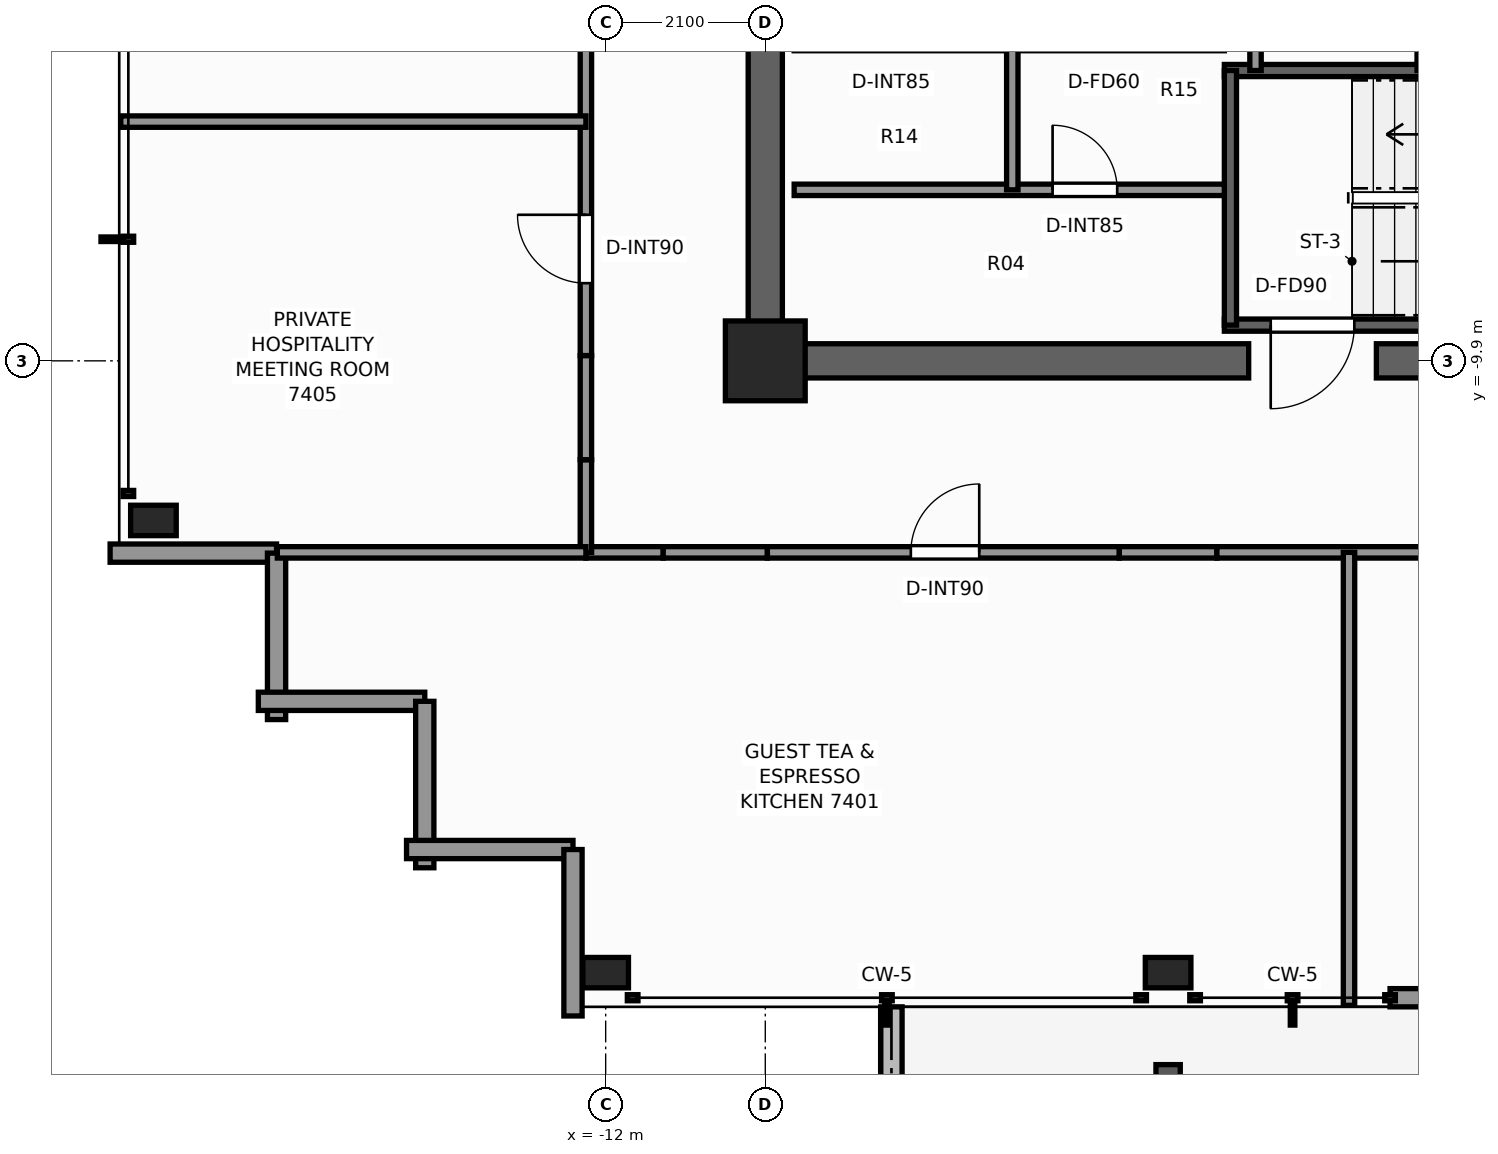
"""IFC4 building model, lengths in metres.
Left out: names, types, materials, properties, quantities, classifications, styles, units other than length and angle.
Written with IfcOpenShell. Run it as: python <this file> out.ifc"""

import sys

from ifc_helpers import new_model, si_unit, direction, frame, frame_2d, origin, origin_2d, place, context, subcontext, project, spatial, rectangle, extrude, element, fill, save


model = new_model("IFC4")
c1 = context("Model", 3, precision=1e-05, world=origin(), true_north=direction((0.0, 1.0)))
c2 = subcontext(c1, "Body", "Model", "MODEL_VIEW")
j1 = project(units=[si_unit("LENGTHUNIT", "METRE"), si_unit("PLANEANGLEUNIT", "RADIAN")], contexts=[c1])
p1 = place(None, origin())
s1 = spatial("IfcSite", under=j1, at=p1, CompositionType="ELEMENT")
p2 = place(p1, origin())
s2 = spatial("IfcBuilding", under=s1, at=p2, CompositionType="ELEMENT")
p3 = place(p2, frame((0.0, 0.0, 254.9)))
s3 = spatial("IfcBuildingStorey", under=s2, at=p3, CompositionType="ELEMENT", Elevation=254.9)
p4 = place(p3, frame((10.125, -9.9, 0.0), z_axis=(0.0, 0.0, 1.0), x_axis=(-1.0, 0.0, 0.0)))
e1 = element("IfcWall", 1, at=p4, inside=s3, PredefinedType="SHEAR", context=c2, shape_type="SweptSolid", body=[
    extrude(rectangle(XDim=11.985, YDim=0.45, at=frame_2d((5.993, 0.0))), origin(), (0.0, 0.0, 1.0), 3.5),
])
p5 = place(p3, frame((-3.54, -9.9, 0.0), z_axis=(0.0, 0.0, 1.0), x_axis=(-1.0, 0.0, 0.0)))
e2 = element("IfcWall", 2, at=p5, inside=s3, PredefinedType="SHEAR", context=c2, shape_type="SweptSolid", body=[
    extrude(rectangle(XDim=6.585, YDim=0.45, at=frame_2d((3.292, 0.0))), origin(), (0.0, 0.0, 1.0), 3.5),
])
p6 = place(p3, frame((-9.9, -9.675, 0.0), z_axis=(0.0, 0.0, 1.0), x_axis=(0.0, 1.0, 0.0)))
e3 = element("IfcWall", 3, at=p6, inside=s3, PredefinedType="SHEAR", context=c2, shape_type="SweptSolid", body=[
    extrude(rectangle(XDim=4.125, YDim=0.45, at=frame_2d((2.062, 0.0))), origin(), (0.0, 0.0, 1.0), 3.5),
])
p7 = place(p3, frame((-9.9, -9.9, 0.0), z_axis=(0.0, 0.0, 1.0), x_axis=(1.0, 0.0, 0.0)))
e4 = element("IfcColumn", 4, at=p7, inside=s3, PredefinedType="COLUMN", context=c2, shape_type="SweptSolid", body=[
    extrude(rectangle(XDim=1.05, YDim=1.05, at=origin_2d()), origin(), (0.0, 0.0, 1.0), 3.5),
])
for number, where, z_axis, x_axis in (
    (5, (-12.0, -17.95, 0.0), (0.0, 0.0, 1.0), (1.0, 0.0, 0.0)),
    (6, (-4.6, -17.95, 0.0), (0.0, 0.0, 1.0), (1.0, 0.0, 0.0)),
    (7, (-17.95, -12.0, 0.0), (0.0, 0.0, 1.0), (1.0, 0.0, 0.0)),
):
    element("IfcColumn", number, at=place(p3, frame(where, z_axis=z_axis, x_axis=x_axis)), inside=s3, PredefinedType="COLUMN", context=c2, shape_type="SweptSolid", body=[
        extrude(rectangle(XDim=0.6, YDim=0.4, at=origin_2d()), origin(), (0.0, 0.0, 1.0), 3.5),
    ])
p8 = place(p3, frame((-8.24, -18.4, -0.07), z_axis=(0.0, 0.0, 1.0), x_axis=(0.0, -1.0, 0.0)))
e8 = element("IfcWall", 8, at=p8, inside=s3, PredefinedType="PARAPET", context=c2, shape_type="SweptSolid", body=[
    extrude(rectangle(XDim=2.674, YDim=0.28, at=frame_2d((1.337, 0.0))), origin(), (0.0, 0.0, 1.0), 0.42),
])
p9 = place(p3, frame((1.68, -18.28, 0.0), z_axis=(0.0, 0.0, 1.0), x_axis=(-1.0, 0.0, 0.0)))
e9 = element("IfcWall", 9, at=p9, inside=s3, PredefinedType="STANDARD", context=c2, shape_type="SweptSolid", body=[
    extrude(rectangle(XDim=3.36, YDim=0.24, at=frame_2d((1.68, 0.0))), origin(), (0.0, 0.0, 1.0), 3.22),
])
p10 = place(p9, frame((0.78, 0.0, 0.0)))
e10 = element("IfcOpeningElement", 10, at=p10, cuts=e9, PredefinedType="OPENING", context=c2, shape_type="SweptSolid", body=[
    extrude(rectangle(XDim=1.8, YDim=2.2, at=frame_2d((0.9, 1.1))), frame((0.0, 0.13, 0.0), z_axis=(0.0, -1.0, 0.0), x_axis=(1.0, 0.0, 0.0)), (0.0, 0.0, 1.0), 0.26),
])
p11 = place(p3, frame((-16.33, -12.43, 0.0), z_axis=(0.0, 0.0, 1.0), x_axis=(-1.0, 0.0, 0.0)))
e11 = element("IfcWall", 11, at=p11, inside=s3, PredefinedType="STANDARD", context=c2, shape_type="SweptSolid", body=[
    extrude(rectangle(XDim=2.19, YDim=0.24, at=frame_2d((1.095, 0.0))), origin(), (0.0, 0.0, 1.0), 1.415),
])
for number, where, z_axis, x_axis in (
    (12, (-16.33, -14.62, 0.0), (0.0, 0.0, 1.0), (0.0, 1.0, 0.0)),
    (13, (-14.38, -14.38, 0.0), (0.0, 0.0, 1.0), (-1.0, 0.0, 0.0)),
    (14, (-14.38, -16.57, 0.0), (0.0, 0.0, 1.0), (0.0, 1.0, 0.0)),
    (15, (-12.43, -16.33, 0.0), (0.0, 0.0, 1.0), (-1.0, 0.0, 0.0)),
):
    element("IfcWall", number, at=place(p3, frame(where, z_axis=z_axis, x_axis=x_axis)), inside=s3, PredefinedType="STANDARD", context=c2, shape_type="SweptSolid", body=[
        extrude(rectangle(XDim=2.19, YDim=0.24, at=frame_2d((1.095, 0.0))), origin(), (0.0, 0.0, 1.0), 2.603),
    ])
p12 = place(p3, frame((-12.43, -18.52, 0.0), z_axis=(0.0, 0.0, 1.0), x_axis=(0.0, 1.0, 0.0)))
e16 = element("IfcWall", 16, at=p12, inside=s3, PredefinedType="STANDARD", context=c2, shape_type="SweptSolid", body=[
    extrude(rectangle(XDim=2.19, YDim=0.24, at=frame_2d((1.095, 0.0))), origin(), (0.0, 0.0, 1.0), 1.415),
])
p13 = place(p3, frame((3.86, -9.43, 0.0), z_axis=(0.0, 0.0, 1.0), x_axis=(-1.0, 0.0, 0.0)))
e17 = element("IfcWall", 17, at=p13, inside=s3, PredefinedType="SHEAR", context=c2, shape_type="SweptSolid", body=[
    extrude(rectangle(XDim=7.72, YDim=0.16, at=frame_2d((3.86, 0.0))), origin(), (0.0, 0.0, 1.0), 3.5),
])
p14 = place(p13, frame((6.01, 0.0, 0.0)))
e18 = element("IfcOpeningElement", 18, at=p14, cuts=e17, PredefinedType="OPENING", context=c2, shape_type="SweptSolid", body=[
    extrude(rectangle(XDim=1.1, YDim=2.2, at=frame_2d((0.55, 1.1))), frame((0.0, 0.09, 0.0), z_axis=(0.0, -1.0, 0.0), x_axis=(1.0, 0.0, 0.0)), (0.0, 0.0, 1.0), 0.18),
])
p15 = place(p3, frame((-3.86, -6.08, 0.0), z_axis=(0.0, 0.0, 1.0), x_axis=(1.0, 0.0, 0.0)))
e19 = element("IfcWall", 19, at=p15, inside=s3, PredefinedType="SHEAR", context=c2, shape_type="SweptSolid", body=[
    extrude(rectangle(XDim=7.72, YDim=0.16, at=frame_2d((3.86, 0.0))), origin(), (0.0, 0.0, 1.0), 3.5),
])
p16 = place(p3, frame((-3.78, -9.43, 0.0), z_axis=(0.0, 0.0, 1.0), x_axis=(0.0, 1.0, 0.0)))
e20 = element("IfcWall", 20, at=p16, inside=s3, PredefinedType="SHEAR", context=c2, shape_type="SweptSolid", body=[
    extrude(rectangle(XDim=3.35, YDim=0.16, at=frame_2d((1.675, 0.0))), origin(), (0.0, 0.0, 1.0), 3.5),
])
p17 = place(p3, frame((-9.52, -7.65, 0.0), z_axis=(0.0, 0.0, 1.0), x_axis=(1.0, 0.0, 0.0)))
e21 = element("IfcWall", 21, at=p17, inside=s3, PredefinedType="PARTITIONING", context=c2, shape_type="SweptSolid", body=[
    extrude(rectangle(XDim=5.66, YDim=0.15, at=frame_2d((2.83, 0.0))), origin(), (0.0, 0.0, 1.0), 3.22),
])
p18 = place(p17, frame((3.4, 0.0, 0.0)))
e22 = element("IfcOpeningElement", 22, at=p18, cuts=e21, PredefinedType="OPENING", context=c2, shape_type="SweptSolid", body=[
    extrude(rectangle(XDim=0.85, YDim=2.03, at=frame_2d((0.425, 1.015))), frame((0.0, 0.085, 0.0), z_axis=(0.0, -1.0, 0.0), x_axis=(1.0, 0.0, 0.0)), (0.0, 0.0, 1.0), 0.17),
])
p19 = place(p3, frame((-6.65, -7.65, 0.0), z_axis=(0.0, 0.0, 1.0), x_axis=(0.0, 1.0, 0.0)))
e23 = element("IfcWall", 23, at=p19, inside=s3, PredefinedType="PARTITIONING", context=c2, shape_type="SweptSolid", body=[
    extrude(rectangle(XDim=1.93, YDim=0.15, at=frame_2d((0.965, 0.0))), origin(), (0.0, 0.0, 1.0), 3.22),
])
p20 = place(p3, frame((-3.45, -6.08, 0.0), z_axis=(0.0, 0.0, 1.0), x_axis=(0.0, 1.0, 0.0)))
e24 = element("IfcWall", 24, at=p20, inside=s3, PredefinedType="PARTITIONING", context=c2, shape_type="SweptSolid", body=[
    extrude(rectangle(XDim=2.36, YDim=0.15, at=frame_2d((1.18, 0.0))), origin(), (0.0, 0.0, 1.0), 3.22),
])
p21 = place(p3, frame((-1.25, -6.08, 0.0), z_axis=(0.0, 0.0, 1.0), x_axis=(0.0, 1.0, 0.0)))
e25 = element("IfcWall", 25, at=p21, inside=s3, PredefinedType="PARTITIONING", context=c2, shape_type="SweptSolid", body=[
    extrude(rectangle(XDim=2.36, YDim=0.15, at=frame_2d((1.18, 0.0))), origin(), (0.0, 0.0, 1.0), 3.22),
])
p22 = place(p21, frame((0.65, 0.0, 0.0)))
e26 = element("IfcOpeningElement", 26, at=p22, cuts=e25, PredefinedType="OPENING", context=c2, shape_type="SweptSolid", body=[
    extrude(rectangle(XDim=0.9, YDim=2.06, at=frame_2d((0.45, 1.03))), frame((0.0, 0.085, 0.0), z_axis=(0.0, -1.0, 0.0), x_axis=(1.0, 0.0, 0.0)), (0.0, 0.0, 1.0), 0.17),
])
p23 = place(p3, frame((-12.26, -12.42, 0.0), z_axis=(0.0, 0.0, 1.0), x_axis=(1.0, 0.0, 0.0)))
e27 = element("IfcWall", 27, at=p23, inside=s3, PredefinedType="PARTITIONING", context=c2, shape_type="SweptSolid", body=[
    extrude(rectangle(XDim=1.018, YDim=0.15, at=frame_2d((0.509, 0.0))), origin(), (0.0, 0.0, 1.0), 3.22),
])
p24 = place(p3, frame((-11.242, -12.42, 0.0), z_axis=(0.0, 0.0, 1.0), x_axis=(1.0, 0.0, 0.0)))
e28 = element("IfcWall", 28, at=p24, inside=s3, PredefinedType="PARTITIONING", context=c2, shape_type="SweptSolid", body=[
    extrude(rectangle(XDim=1.37, YDim=0.15, at=frame_2d((0.685, 0.0))), origin(), (0.0, 0.0, 1.0), 1.405),
])
p25 = place(p3, frame((-9.872, -12.42, 0.0), z_axis=(0.0, 0.0, 1.0), x_axis=(1.0, 0.0, 0.0)))
e29 = element("IfcWall", 29, at=p25, inside=s3, PredefinedType="PARTITIONING", context=c2, shape_type="SweptSolid", body=[
    extrude(rectangle(XDim=4.63, YDim=0.15, at=frame_2d((2.315, 0.0))), origin(), (0.0, 0.0, 1.0), 3.22),
])
p26 = place(p25, frame((1.887, 0.0, 0.0)))
e30 = element("IfcOpeningElement", 30, at=p26, cuts=e29, PredefinedType="OPENING", context=c2, shape_type="SweptSolid", body=[
    extrude(rectangle(XDim=0.9, YDim=2.06, at=frame_2d((0.45, 1.03))), frame((0.0, 0.085, 0.0), z_axis=(0.0, -1.0, 0.0), x_axis=(1.0, 0.0, 0.0)), (0.0, 0.0, 1.0), 0.17),
])
p27 = place(p3, frame((-5.242, -12.42, 0.0), z_axis=(0.0, 0.0, 1.0), x_axis=(1.0, 0.0, 0.0)))
e31 = element("IfcWall", 31, at=p27, inside=s3, PredefinedType="PARTITIONING", context=c2, shape_type="SweptSolid", body=[
    extrude(rectangle(XDim=1.284, YDim=0.15, at=frame_2d((0.642, 0.0))), origin(), (0.0, 0.0, 1.0), 1.405),
])
p28 = place(p3, frame((-3.958, -12.42, 0.0), z_axis=(0.0, 0.0, 1.0), x_axis=(1.0, 0.0, 0.0)))
e32 = element("IfcWall", 32, at=p28, inside=s3, PredefinedType="PARTITIONING", context=c2, shape_type="SweptSolid", body=[
    extrude(rectangle(XDim=7.916, YDim=0.15, at=frame_2d((3.958, 0.0))), origin(), (0.0, 0.0, 1.0), 2.745),
])
p29 = place(p3, frame((-12.26, -12.42, 0.0), z_axis=(0.0, 0.0, 1.0), x_axis=(0.0, 1.0, 0.0)))
e33 = element("IfcWall", 33, at=p29, inside=s3, PredefinedType="PARTITIONING", context=c2, shape_type="SweptSolid", body=[
    extrude(rectangle(XDim=1.219, YDim=0.15, at=frame_2d((0.61, 0.0))), origin(), (0.0, 0.0, 1.0), 3.22),
])
p30 = place(p3, frame((-12.26, -11.201, 0.0), z_axis=(0.0, 0.0, 1.0), x_axis=(0.0, 1.0, 0.0)))
e34 = element("IfcWall", 34, at=p30, inside=s3, PredefinedType="PARTITIONING", context=c2, shape_type="SweptSolid", body=[
    extrude(rectangle(XDim=1.37, YDim=0.15, at=frame_2d((0.685, 0.0))), origin(), (0.0, 0.0, 1.0), 1.405),
])
p31 = place(p3, frame((-12.26, -9.83, 0.0), z_axis=(0.0, 0.0, 1.0), x_axis=(0.0, 1.0, 0.0)))
e35 = element("IfcWall", 35, at=p31, inside=s3, PredefinedType="PARTITIONING", context=c2, shape_type="SweptSolid", body=[
    extrude(rectangle(XDim=4.588, YDim=0.15, at=frame_2d((2.294, 0.0))), origin(), (0.0, 0.0, 1.0), 3.22),
])
p32 = place(p31, frame((0.952, 0.0, 0.0)))
e36 = element("IfcOpeningElement", 36, at=p32, cuts=e35, PredefinedType="OPENING", context=c2, shape_type="SweptSolid", body=[
    extrude(rectangle(XDim=0.9, YDim=2.06, at=frame_2d((0.45, 1.03))), frame((0.0, 0.085, 0.0), z_axis=(0.0, -1.0, 0.0), x_axis=(1.0, 0.0, 0.0)), (0.0, 0.0, 1.0), 0.17),
])
p33 = place(p3, frame((-16.32, -12.42, 0.0), z_axis=(0.0, 0.0, 1.0), x_axis=(1.0, 0.0, 0.0)))
e37 = element("IfcWall", 37, at=p33, inside=s3, PredefinedType="PARTITIONING", context=c2, shape_type="SweptSolid", body=[
    extrude(rectangle(XDim=4.06, YDim=0.15, at=frame_2d((2.03, 0.0))), origin(), (0.0, 0.0, 1.0), 3.22),
])
p34 = place(p3, frame((-2.22, -18.38, 0.0), z_axis=(0.0, 0.0, 1.0), x_axis=(0.0, 1.0, 0.0)))
e38 = element("IfcWall", 38, at=p34, inside=s3, PredefinedType="PARTITIONING", context=c2, shape_type="SweptSolid", body=[
    extrude(rectangle(XDim=5.96, YDim=0.15, at=frame_2d((2.98, 0.0))), origin(), (0.0, 0.0, 1.0), 2.593),
])
p35 = place(p3, frame((-18.38, -6.752, 0.0), z_axis=(0.0, 0.0, 1.0), x_axis=(1.0, 0.0, 0.0)))
e39 = element("IfcWall", 39, at=p35, inside=s3, PredefinedType="PARTITIONING", context=c2, shape_type="SweptSolid", body=[
    extrude(rectangle(XDim=6.12, YDim=0.15, at=frame_2d((3.06, 0.0))), origin(), (0.0, 0.0, 1.0), 2.593),
])
p36 = place(p14, origin())
e40 = element("IfcDoor", 40, at=p36, inside=s3, OperationType="SINGLE_SWING_RIGHT", PredefinedType="DOOR", context=c2, shape_type="SweptSolid", body=[
    extrude(rectangle(XDim=1.1, YDim=2.2, at=frame_2d((0.55, 1.1))), frame((0.0, 0.025, 0.0), z_axis=(0.0, -1.0, 0.0), x_axis=(1.0, 0.0, 0.0)), (0.0, 0.0, 1.0), 0.05),
])
fill(e18, e40)
p37 = place(p18, origin())
e41 = element("IfcDoor", 41, at=p37, inside=s3, OperationType="SINGLE_SWING_LEFT", PredefinedType="DOOR", context=c2, shape_type="SweptSolid", body=[
    extrude(rectangle(XDim=0.85, YDim=2.03, at=frame_2d((0.425, 1.015))), frame((0.0, 0.025, 0.0), z_axis=(0.0, -1.0, 0.0), x_axis=(1.0, 0.0, 0.0)), (0.0, 0.0, 1.0), 0.05),
])
fill(e22, e41)
p38 = place(p26, origin())
e42 = element("IfcDoor", 42, at=p38, inside=s3, OperationType="SINGLE_SWING_RIGHT", PredefinedType="DOOR", context=c2, shape_type="SweptSolid", body=[
    extrude(rectangle(XDim=0.9, YDim=2.06, at=frame_2d((0.45, 1.03))), frame((0.0, 0.025, 0.0), z_axis=(0.0, -1.0, 0.0), x_axis=(1.0, 0.0, 0.0)), (0.0, 0.0, 1.0), 0.05),
])
fill(e30, e42)
p39 = place(p32, origin())
e43 = element("IfcDoor", 43, at=p39, inside=s3, OperationType="SINGLE_SWING_RIGHT", PredefinedType="DOOR", context=c2, shape_type="SweptSolid", body=[
    extrude(rectangle(XDim=0.9, YDim=2.06, at=frame_2d((0.45, 1.03))), frame((0.0, 0.025, 0.0), z_axis=(0.0, -1.0, 0.0), x_axis=(1.0, 0.0, 0.0)), (0.0, 0.0, 1.0), 0.05),
])
fill(e36, e43)
save(model, sys.argv[1])
